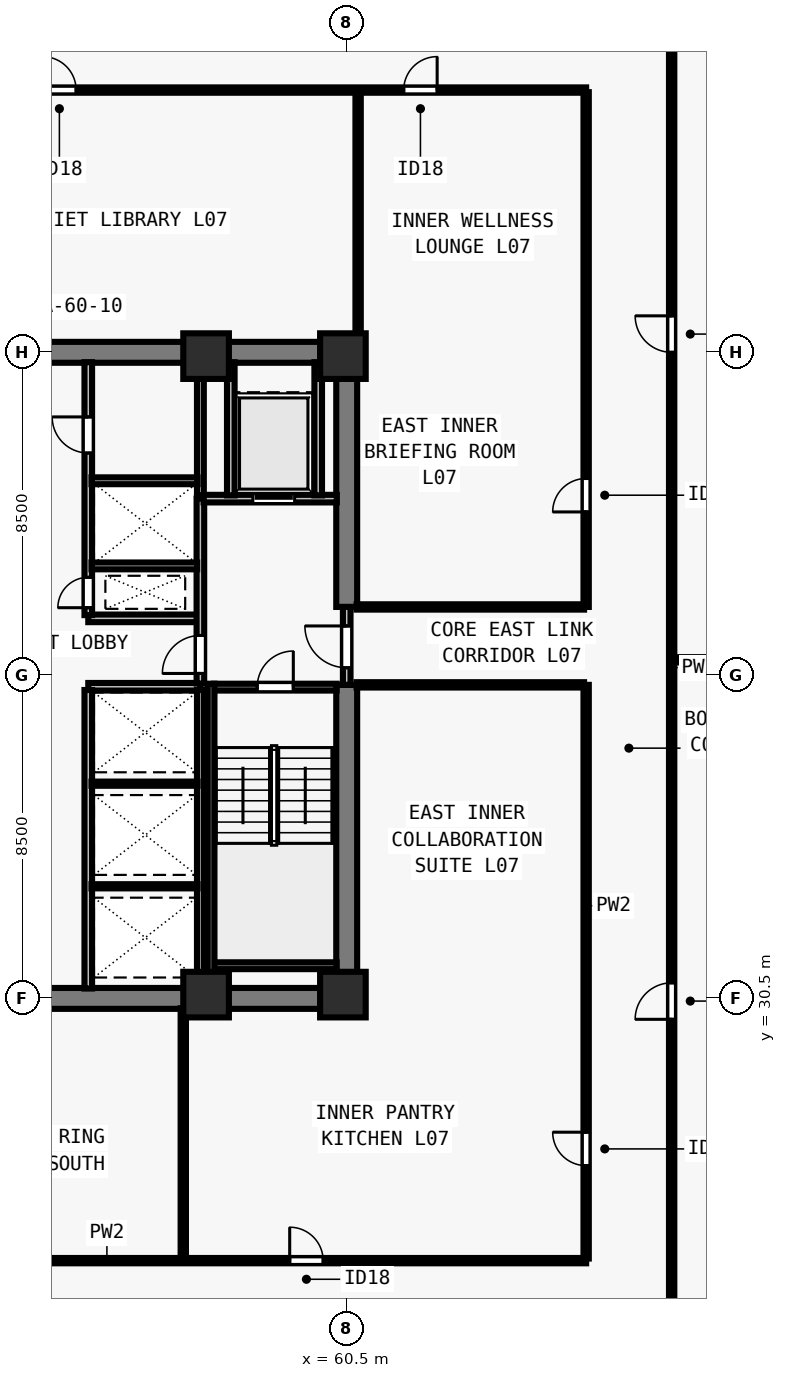
"""IFC4 building model, lengths in metres.
Left out: names, types, materials, properties, quantities, classifications, styles, units other than length and angle.
Written with IfcOpenShell. Run it as: python <this file> out.ifc"""

import sys

from ifc_helpers import new_model, si_unit, direction, frame, frame_2d, origin, origin_2d, place, context, subcontext, project, spatial, rectangle, extrude, element, fill, save


model = new_model("IFC4")
c1 = context("Model", 3, precision=1e-05, world=origin(), true_north=direction((0.0, 1.0)))
c2 = subcontext(c1, "Body", "Model", "MODEL_VIEW")
j1 = project(units=[si_unit("LENGTHUNIT", "METRE"), si_unit("PLANEANGLEUNIT", "RADIAN")], contexts=[c1])
p1 = place(None, origin())
s1 = spatial("IfcSite", under=j1, at=p1, CompositionType="ELEMENT")
p2 = place(p1, origin())
s2 = spatial("IfcBuilding", under=s1, at=p2, CompositionType="ELEMENT")
p3 = place(p2, frame((0.0, 0.0, 30.5)))
s3 = spatial("IfcBuildingStorey", under=s2, at=p3, CompositionType="ELEMENT", Elevation=30.5)
for number, where, z_axis, x_axis in (
    (1, (56.8, 30.6, 0.0), (0.0, 0.0, 1.0), (1.0, 0.0, 0.0)),
    (2, (60.4, 30.6, 0.0), (0.0, 0.0, 1.0), (1.0, 0.0, 0.0)),
    (3, (56.8, 47.4, 0.0), (0.0, 0.0, 1.0), (1.0, 0.0, 0.0)),
    (4, (60.4, 47.4, 0.0), (0.0, 0.0, 1.0), (1.0, 0.0, 0.0)),
):
    element("IfcColumn", number, at=place(p3, frame(where, z_axis=z_axis, x_axis=x_axis)), inside=s3, PredefinedType="COLUMN", context=c2, shape_type="SweptSolid", body=[
        extrude(rectangle(XDim=1.2, YDim=1.2, at=origin_2d()), origin(), (0.0, 0.0, 1.0), 3.5),
    ])
for number, where, z_axis, x_axis in (
    (5, (43.225, 30.5, 0.0), (0.0, 0.0, 1.0), (1.0, 0.0, 0.0)),
    (6, (43.225, 47.5, 0.0), (0.0, 0.0, 1.0), (1.0, 0.0, 0.0)),
):
    element("IfcWall", number, at=place(p3, frame(where, z_axis=z_axis, x_axis=x_axis)), inside=s3, PredefinedType="SHEAR", context=c2, shape_type="SweptSolid", body=[
        extrude(rectangle(XDim=17.55, YDim=0.55, at=frame_2d((8.775, 0.0))), origin(), (0.0, 0.0, 1.0), 3.28),
    ])
p4 = place(p3, frame((60.5, 30.765, 0.0), z_axis=(0.0, 0.0, 1.0), x_axis=(0.0, 1.0, 0.0)))
e7 = element("IfcWall", 7, at=p4, inside=s3, PredefinedType="SHEAR", context=c2, shape_type="SweptSolid", body=[
    extrude(rectangle(XDim=7.985, YDim=0.55, at=frame_2d((3.993, 0.0))), origin(), (0.0, 0.0, 1.0), 3.28),
])
p5 = place(p3, frame((60.5, 40.8, 0.0), z_axis=(0.0, 0.0, 1.0), x_axis=(0.0, 1.0, 0.0)))
e8 = element("IfcWall", 8, at=p5, inside=s3, PredefinedType="SHEAR", context=c2, shape_type="SweptSolid", body=[
    extrude(rectangle(XDim=6.435, YDim=0.55, at=frame_2d((3.218, 0.0))), origin(), (0.0, 0.0, 1.0), 3.28),
])
for number, where, z_axis, x_axis in (
    (9, (53.7, 38.7, 0.0), (0.0, 0.0, 1.0), (1.0, 0.0, 0.0)),
    (10, (53.7, 40.5, 0.0), (0.0, 0.0, 1.0), (1.0, 0.0, 0.0)),
):
    element("IfcWall", number, at=place(p3, frame(where, z_axis=z_axis, x_axis=x_axis)), inside=s3, PredefinedType="SOLIDWALL", context=c2, shape_type="SweptSolid", body=[
        extrude(rectangle(XDim=2.95, YDim=0.2, at=frame_2d((1.475, 0.0))), origin(), (0.0, 0.0, 1.0), 3.28),
    ])
p6 = place(p3, frame((53.7, 30.76, 0.0), z_axis=(0.0, 0.0, 1.0), x_axis=(0.0, 1.0, 0.0)))
e11 = element("IfcWall", 11, at=p6, inside=s3, PredefinedType="SOLIDWALL", context=c2, shape_type="SweptSolid", body=[
    extrude(rectangle(XDim=7.855, YDim=0.2, at=frame_2d((3.927, 0.0))), origin(), (0.0, 0.0, 1.0), 3.28),
])
p7 = place(p3, frame((53.7, 40.585, 0.0), z_axis=(0.0, 0.0, 1.0), x_axis=(0.0, 1.0, 0.0)))
e12 = element("IfcWall", 12, at=p7, inside=s3, PredefinedType="SOLIDWALL", context=c2, shape_type="SweptSolid", body=[
    extrude(rectangle(XDim=6.655, YDim=0.2, at=frame_2d((3.328, 0.0))), origin(), (0.0, 0.0, 1.0), 3.28),
])
p8 = place(p7, frame((0.195, 0.0, 0.0)))
e13 = element("IfcOpeningElement", 13, at=p8, cuts=e12, PredefinedType="OPENING", context=c2, shape_type="SweptSolid", body=[
    extrude(rectangle(XDim=0.8, YDim=2.08, at=frame_2d((0.4, 1.04))), frame((0.0, 0.11, 0.0), z_axis=(0.0, -1.0, 0.0), x_axis=(1.0, 0.0, 0.0)), (0.0, 0.0, 1.0), 0.22),
])
p9 = place(p7, frame((4.265, 0.0, 0.0)))
e14 = element("IfcOpeningElement", 14, at=p9, cuts=e12, PredefinedType="OPENING", context=c2, shape_type="SweptSolid", body=[
    extrude(rectangle(XDim=0.95, YDim=2.12, at=frame_2d((0.475, 1.06))), frame((0.0, 0.11, 0.0), z_axis=(0.0, -1.0, 0.0), x_axis=(1.0, 0.0, 0.0)), (0.0, 0.0, 1.0), 0.22),
])
p10 = place(p3, frame((60.5, 38.75, 0.0), z_axis=(0.0, 0.0, 1.0), x_axis=(0.0, 1.0, 0.0)))
e15 = element("IfcWall", 15, at=p10, inside=s3, PredefinedType="SOLIDWALL", context=c2, shape_type="SweptSolid", body=[
    extrude(rectangle(XDim=2.05, YDim=0.2, at=frame_2d((1.025, 0.0))), origin(), (0.0, 0.0, 1.0), 3.28),
])
p11 = place(p10, frame((0.45, 0.0, 0.0)))
e16 = element("IfcOpeningElement", 16, at=p11, cuts=e15, PredefinedType="OPENING", context=c2, shape_type="SweptSolid", body=[
    extrude(rectangle(XDim=1.1, YDim=2.15, at=frame_2d((0.55, 1.075))), frame((0.0, 0.11, 0.0), z_axis=(0.0, -1.0, 0.0), x_axis=(1.0, 0.0, 0.0)), (0.0, 0.0, 1.0), 0.22),
])
p12 = place(p3, frame((56.65, 38.785, 0.0), z_axis=(0.0, 0.0, 1.0), x_axis=(0.0, 1.0, 0.0)))
e17 = element("IfcWall", 17, at=p12, inside=s3, PredefinedType="SOLIDWALL", context=c2, shape_type="SweptSolid", body=[
    extrude(rectangle(XDim=4.865, YDim=0.2, at=frame_2d((2.433, 0.0))), origin(), (0.0, 0.0, 1.0), 3.28),
])
p13 = place(p12, frame((0.265, 0.0, 0.0)))
e18 = element("IfcOpeningElement", 18, at=p13, cuts=e17, PredefinedType="OPENING", context=c2, shape_type="SweptSolid", body=[
    extrude(rectangle(XDim=1.0, YDim=2.15, at=frame_2d((0.5, 1.075))), frame((0.0, 0.11, 0.0), z_axis=(0.0, -1.0, 0.0), x_axis=(1.0, 0.0, 0.0)), (0.0, 0.0, 1.0), 0.22),
])
p14 = place(p3, frame((56.735, 43.65, 0.0), z_axis=(0.0, 0.0, 1.0), x_axis=(1.0, 0.0, 0.0)))
e19 = element("IfcWall", 19, at=p14, inside=s3, PredefinedType="SOLIDWALL", context=c2, shape_type="SweptSolid", body=[
    extrude(rectangle(XDim=3.505, YDim=0.2, at=frame_2d((1.752, 0.0))), origin(), (0.0, 0.0, 1.0), 3.28),
])
p15 = place(p14, frame((1.295, 0.0, 0.0)))
e20 = element("IfcOpeningElement", 20, at=p15, cuts=e19, PredefinedType="OPENING", context=c2, shape_type="SweptSolid", body=[
    extrude(rectangle(XDim=1.1, YDim=2.2, at=frame_2d((0.55, 1.1))), frame((0.0, 0.11, 0.0), z_axis=(0.0, -1.0, 0.0), x_axis=(1.0, 0.0, 0.0)), (0.0, 0.0, 1.0), 0.22),
])
for number, where, z_axis, x_axis in (
    (21, (57.45, 43.735, 0.0), (0.0, 0.0, 1.0), (0.0, 1.0, 0.0)),
    (22, (59.75, 43.735, 0.0), (0.0, 0.0, 1.0), (0.0, 1.0, 0.0)),
):
    element("IfcWall", number, at=place(p3, frame(where, z_axis=z_axis, x_axis=x_axis)), inside=s3, PredefinedType="SOLIDWALL", context=c2, shape_type="SweptSolid", body=[
        extrude(rectangle(XDim=3.505, YDim=0.2, at=frame_2d((1.752, 0.0))), origin(), (0.0, 0.0, 1.0), 3.28),
    ])
p16 = place(p3, frame((56.65, 30.76, 0.0), z_axis=(0.0, 0.0, 1.0), x_axis=(0.0, 1.0, 0.0)))
e23 = element("IfcWall", 23, at=p16, inside=s3, PredefinedType="SOLIDWALL", context=c2, shape_type="SweptSolid", body=[
    extrude(rectangle(XDim=7.855, YDim=0.18, at=frame_2d((3.927, 0.0))), origin(), (0.0, 0.0, 1.0), 3.28),
])
for number, where, z_axis, x_axis in (
    (24, (53.785, 33.45, 0.0), (0.0, 0.0, 1.0), (1.0, 0.0, 0.0)),
    (25, (53.785, 36.15, 0.0), (0.0, 0.0, 1.0), (1.0, 0.0, 0.0)),
):
    element("IfcWall", number, at=place(p3, frame(where, z_axis=z_axis, x_axis=x_axis)), inside=s3, PredefinedType="PARTITIONING", context=c2, shape_type="SweptSolid", body=[
        extrude(rectangle(XDim=2.79, YDim=0.11, at=frame_2d((1.395, 0.0))), origin(), (0.0, 0.0, 1.0), 3.28),
    ])
p17 = place(p3, frame((56.65, 43.735, 0.0), z_axis=(0.0, 0.0, 1.0), x_axis=(0.0, 1.0, 0.0)))
e26 = element("IfcWall", 26, at=p17, inside=s3, PredefinedType="SOLIDWALL", context=c2, shape_type="SweptSolid", body=[
    extrude(rectangle(XDim=3.505, YDim=0.18, at=frame_2d((1.752, 0.0))), origin(), (0.0, 0.0, 1.0), 3.28),
])
p18 = place(p3, frame((53.785, 41.88, 0.0), z_axis=(0.0, 0.0, 1.0), x_axis=(1.0, 0.0, 0.0)))
e27 = element("IfcWall", 27, at=p18, inside=s3, PredefinedType="SOLIDWALL", context=c2, shape_type="SweptSolid", body=[
    extrude(rectangle(XDim=2.78, YDim=0.18, at=frame_2d((1.39, 0.0))), origin(), (0.0, 0.0, 1.0), 3.28),
])
p19 = place(p3, frame((53.785, 44.12, 0.0), z_axis=(0.0, 0.0, 1.0), x_axis=(1.0, 0.0, 0.0)))
e28 = element("IfcWall", 28, at=p19, inside=s3, PredefinedType="SOLIDWALL", context=c2, shape_type="SweptSolid", body=[
    extrude(rectangle(XDim=2.79, YDim=0.18, at=frame_2d((1.395, 0.0))), origin(), (0.0, 0.0, 1.0), 3.28),
])
p20 = place(p3, frame((69.05, 21.405, 0.0), z_axis=(0.0, 0.0, 1.0), x_axis=(0.0, 1.0, 0.0)))
e29 = element("IfcWall", 29, at=p20, inside=s3, PredefinedType="PARTITIONING", context=c2, shape_type="SweptSolid", body=[
    extrude(rectangle(XDim=35.19, YDim=0.14, at=frame_2d((17.595, 0.0))), origin(), (0.0, 0.0, 1.0), 3.28),
])
p21 = place(p20, frame((8.545, 0.0, 0.0)))
e30 = element("IfcOpeningElement", 30, at=p21, cuts=e29, PredefinedType="OPENING", context=c2, shape_type="SweptSolid", body=[
    extrude(rectangle(XDim=0.96, YDim=2.12, at=frame_2d((0.48, 1.06))), frame((0.0, 0.08, 0.0), z_axis=(0.0, -1.0, 0.0), x_axis=(1.0, 0.0, 0.0)), (0.0, 0.0, 1.0), 0.16),
])
p22 = place(p20, frame((26.095, 0.0, 0.0)))
e31 = element("IfcOpeningElement", 31, at=p22, cuts=e29, PredefinedType="OPENING", context=c2, shape_type="SweptSolid", body=[
    extrude(rectangle(XDim=0.96, YDim=2.12, at=frame_2d((0.48, 1.06))), frame((0.0, 0.08, 0.0), z_axis=(0.0, -1.0, 0.0), x_axis=(1.0, 0.0, 0.0)), (0.0, 0.0, 1.0), 0.16),
])
p23 = place(p3, frame((37.2, 23.6, 0.0), z_axis=(0.0, 0.0, 1.0), x_axis=(1.0, 0.0, 0.0)))
e32 = element("IfcWall", 32, at=p23, inside=s3, PredefinedType="PARTITIONING", context=c2, shape_type="SweptSolid", body=[
    extrude(rectangle(XDim=29.6, YDim=0.14, at=frame_2d((14.8, 0.0))), origin(), (0.0, 0.0, 1.0), 3.28),
])
p24 = place(p23, frame((1.2, 0.0, 0.0)))
e33 = element("IfcOpeningElement", 33, at=p24, cuts=e32, PredefinedType="OPENING", context=c2, shape_type="SweptSolid", body=[
    extrude(rectangle(XDim=0.88, YDim=2.1, at=frame_2d((0.44, 1.05))), frame((0.0, 0.08, 0.0), z_axis=(0.0, -1.0, 0.0), x_axis=(1.0, 0.0, 0.0)), (0.0, 0.0, 1.0), 0.16),
])
p25 = place(p23, frame((11.3, 0.0, 0.0)))
e34 = element("IfcOpeningElement", 34, at=p25, cuts=e32, PredefinedType="OPENING", context=c2, shape_type="SweptSolid", body=[
    extrude(rectangle(XDim=0.88, YDim=2.1, at=frame_2d((0.44, 1.05))), frame((0.0, 0.08, 0.0), z_axis=(0.0, -1.0, 0.0), x_axis=(1.0, 0.0, 0.0)), (0.0, 0.0, 1.0), 0.16),
])
p26 = place(p23, frame((21.8, 0.0, 0.0)))
e35 = element("IfcOpeningElement", 35, at=p26, cuts=e32, PredefinedType="OPENING", context=c2, shape_type="SweptSolid", body=[
    extrude(rectangle(XDim=0.88, YDim=2.1, at=frame_2d((0.44, 1.05))), frame((0.0, 0.08, 0.0), z_axis=(0.0, -1.0, 0.0), x_axis=(1.0, 0.0, 0.0)), (0.0, 0.0, 1.0), 0.16),
])
p27 = place(p3, frame((37.2, 54.4, 0.0), z_axis=(0.0, 0.0, 1.0), x_axis=(1.0, 0.0, 0.0)))
e36 = element("IfcWall", 36, at=p27, inside=s3, PredefinedType="PARTITIONING", context=c2, shape_type="SweptSolid", body=[
    extrude(rectangle(XDim=29.6, YDim=0.14, at=frame_2d((14.8, 0.0))), origin(), (0.0, 0.0, 1.0), 3.28),
])
p28 = place(p27, frame((2.2, 0.0, 0.0)))
e37 = element("IfcOpeningElement", 37, at=p28, cuts=e36, PredefinedType="OPENING", context=c2, shape_type="SweptSolid", body=[
    extrude(rectangle(XDim=0.88, YDim=2.1, at=frame_2d((0.44, 1.05))), frame((0.0, 0.08, 0.0), z_axis=(0.0, -1.0, 0.0), x_axis=(1.0, 0.0, 0.0)), (0.0, 0.0, 1.0), 0.16),
])
p29 = place(p27, frame((15.3, 0.0, 0.0)))
e38 = element("IfcOpeningElement", 38, at=p29, cuts=e36, PredefinedType="OPENING", context=c2, shape_type="SweptSolid", body=[
    extrude(rectangle(XDim=0.88, YDim=2.1, at=frame_2d((0.44, 1.05))), frame((0.0, 0.08, 0.0), z_axis=(0.0, -1.0, 0.0), x_axis=(1.0, 0.0, 0.0)), (0.0, 0.0, 1.0), 0.16),
])
p30 = place(p27, frame((24.8, 0.0, 0.0)))
e39 = element("IfcOpeningElement", 39, at=p30, cuts=e36, PredefinedType="OPENING", context=c2, shape_type="SweptSolid", body=[
    extrude(rectangle(XDim=0.88, YDim=2.1, at=frame_2d((0.44, 1.05))), frame((0.0, 0.08, 0.0), z_axis=(0.0, -1.0, 0.0), x_axis=(1.0, 0.0, 0.0)), (0.0, 0.0, 1.0), 0.16),
])
p31 = place(p3, frame((66.8, 23.655, 0.0), z_axis=(0.0, 0.0, 1.0), x_axis=(0.0, 1.0, 0.0)))
e40 = element("IfcWall", 40, at=p31, inside=s3, PredefinedType="PARTITIONING", context=c2, shape_type="SweptSolid", body=[
    extrude(rectangle(XDim=15.095, YDim=0.14, at=frame_2d((7.547, 0.0))), origin(), (0.0, 0.0, 1.0), 3.28),
])
p32 = place(p31, frame((2.445, 0.0, 0.0)))
e41 = element("IfcOpeningElement", 41, at=p32, cuts=e40, PredefinedType="OPENING", context=c2, shape_type="SweptSolid", body=[
    extrude(rectangle(XDim=0.88, YDim=2.1, at=frame_2d((0.44, 1.05))), frame((0.0, 0.08, 0.0), z_axis=(0.0, -1.0, 0.0), x_axis=(1.0, 0.0, 0.0)), (0.0, 0.0, 1.0), 0.16),
])
p33 = place(p3, frame((66.8, 40.8, 0.0), z_axis=(0.0, 0.0, 1.0), x_axis=(0.0, 1.0, 0.0)))
e42 = element("IfcWall", 42, at=p33, inside=s3, PredefinedType="PARTITIONING", context=c2, shape_type="SweptSolid", body=[
    extrude(rectangle(XDim=13.545, YDim=0.14, at=frame_2d((6.772, 0.0))), origin(), (0.0, 0.0, 1.0), 3.28),
])
p34 = place(p33, frame((2.5, 0.0, 0.0)))
e43 = element("IfcOpeningElement", 43, at=p34, cuts=e42, PredefinedType="OPENING", context=c2, shape_type="SweptSolid", body=[
    extrude(rectangle(XDim=0.88, YDim=2.1, at=frame_2d((0.44, 1.05))), frame((0.0, 0.08, 0.0), z_axis=(0.0, -1.0, 0.0), x_axis=(1.0, 0.0, 0.0)), (0.0, 0.0, 1.0), 0.16),
])
for number, where, z_axis, x_axis in (
    (44, (60.76, 38.75, 0.0), (0.0, 0.0, 1.0), (1.0, 0.0, 0.0)),
    (45, (60.76, 40.8, 0.0), (0.0, 0.0, 1.0), (1.0, 0.0, 0.0)),
):
    element("IfcWall", number, at=place(p3, frame(where, z_axis=z_axis, x_axis=x_axis)), inside=s3, PredefinedType="PARTITIONING", context=c2, shape_type="SweptSolid", body=[
        extrude(rectangle(XDim=5.985, YDim=0.14, at=frame_2d((2.993, 0.0))), origin(), (0.0, 0.0, 1.0), 3.28),
    ])
p35 = place(p3, frame((56.2, 23.655, 0.0), z_axis=(0.0, 0.0, 1.0), x_axis=(0.0, 1.0, 0.0)))
e46 = element("IfcWall", 46, at=p35, inside=s3, PredefinedType="PARTITIONING", context=c2, shape_type="SweptSolid", body=[
    extrude(rectangle(XDim=6.585, YDim=0.14, at=frame_2d((3.292, 0.0))), origin(), (0.0, 0.0, 1.0), 2.849),
])
p36 = place(p3, frame((60.8, 47.76, 0.0), z_axis=(0.0, 0.0, 1.0), x_axis=(0.0, 1.0, 0.0)))
e47 = element("IfcWall", 47, at=p36, inside=s3, PredefinedType="PARTITIONING", context=c2, shape_type="SweptSolid", body=[
    extrude(rectangle(XDim=6.585, YDim=0.14, at=frame_2d((3.292, 0.0))), origin(), (0.0, 0.0, 1.0), 2.439),
])
p37 = place(p3, frame((69.15, 39.409, 0.0), z_axis=(0.0, 0.0, 1.0), x_axis=(1.0, 0.0, 0.0)))
e48 = element("IfcWall", 48, at=p37, inside=s3, PredefinedType="PARTITIONING", context=c2, shape_type="SweptSolid", body=[
    extrude(rectangle(XDim=7.93, YDim=0.14, at=frame_2d((3.965, 0.0))), origin(), (0.0, 0.0, 1.0), 3.28),
])
p38 = place(p3, frame((57.005, 38.69, 0.0), z_axis=(0.0, 0.0, 1.0), x_axis=(1.0, 0.0, 0.0)))
e49 = element("IfcWall", 49, at=p38, inside=s3, PredefinedType="SOLIDWALL", context=c2, shape_type="SweptSolid", body=[
    extrude(rectangle(XDim=3.23, YDim=0.18, at=frame_2d((1.615, 0.0))), origin(), (0.0, 0.0, 1.0), 3.28),
])
p39 = place(p38, frame((1.14, 0.0, 0.0)))
e50 = element("IfcOpeningElement", 50, at=p39, cuts=e49, PredefinedType="OPENING", context=c2, shape_type="SweptSolid", body=[
    extrude(rectangle(XDim=0.95, YDim=2.15, at=frame_2d((0.475, 1.075))), frame((0.0, 0.1, 0.0), z_axis=(0.0, -1.0, 0.0), x_axis=(1.0, 0.0, 0.0)), (0.0, 0.0, 1.0), 0.2),
])
p40 = place(p3, frame((57.005, 31.36, 0.0), z_axis=(0.0, 0.0, 1.0), x_axis=(1.0, 0.0, 0.0)))
e51 = element("IfcWall", 51, at=p40, inside=s3, PredefinedType="SOLIDWALL", context=c2, shape_type="SweptSolid", body=[
    extrude(rectangle(XDim=3.23, YDim=0.18, at=frame_2d((1.615, 0.0))), origin(), (0.0, 0.0, 1.0), 3.28),
])
p41 = place(p3, frame((56.93, 38.78, 0.0), z_axis=(0.0, 0.0, 1.0), x_axis=(0.0, -1.0, 0.0)))
e52 = element("IfcWall", 52, at=p41, inside=s3, PredefinedType="SOLIDWALL", context=c2, shape_type="SweptSolid", body=[
    extrude(rectangle(XDim=8.017, YDim=0.18, at=frame_2d((4.009, 0.0))), origin(), (0.0, 0.0, 1.0), 3.28),
])
p42 = place(p11, origin())
e53 = element("IfcDoor", 53, at=p42, inside=s3, OperationType="SINGLE_SWING_RIGHT", PredefinedType="DOOR", context=c2, shape_type="SweptSolid", body=[
    extrude(rectangle(XDim=1.1, YDim=2.15, at=frame_2d((0.55, 1.075))), frame((0.0, 0.025, 0.0), z_axis=(0.0, -1.0, 0.0), x_axis=(1.0, 0.0, 0.0)), (0.0, 0.0, 1.0), 0.05),
])
fill(e16, e53)
p43 = place(p13, origin())
e54 = element("IfcDoor", 54, at=p43, inside=s3, OperationType="SINGLE_SWING_LEFT", PredefinedType="DOOR", context=c2, shape_type="SweptSolid", body=[
    extrude(rectangle(XDim=1.0, YDim=2.15, at=frame_2d((0.5, 1.075))), frame((0.0, 0.025, 0.0), z_axis=(0.0, -1.0, 0.0), x_axis=(1.0, 0.0, 0.0)), (0.0, 0.0, 1.0), 0.05),
])
fill(e18, e54)
p44 = place(p15, origin())
e55 = element("IfcDoor", 55, at=p44, inside=s3, OperationType="SLIDING_TO_LEFT", PredefinedType="DOOR", context=c2, shape_type="SweptSolid", body=[
    extrude(rectangle(XDim=1.1, YDim=2.2, at=frame_2d((0.55, 1.1))), frame((0.0, 0.025, 0.0), z_axis=(0.0, -1.0, 0.0), x_axis=(1.0, 0.0, 0.0)), (0.0, 0.0, 1.0), 0.05),
])
fill(e20, e55)
p45 = place(p8, origin())
e56 = element("IfcDoor", 56, at=p45, inside=s3, OperationType="SINGLE_SWING_LEFT", PredefinedType="DOOR", context=c2, shape_type="SweptSolid", body=[
    extrude(rectangle(XDim=0.8, YDim=2.08, at=frame_2d((0.4, 1.04))), frame((0.0, 0.025, 0.0), z_axis=(0.0, -1.0, 0.0), x_axis=(1.0, 0.0, 0.0)), (0.0, 0.0, 1.0), 0.05),
])
fill(e13, e56)
p46 = place(p9, origin())
e57 = element("IfcDoor", 57, at=p46, inside=s3, OperationType="SINGLE_SWING_RIGHT", PredefinedType="DOOR", context=c2, shape_type="SweptSolid", body=[
    extrude(rectangle(XDim=0.95, YDim=2.12, at=frame_2d((0.475, 1.06))), frame((0.0, 0.025, 0.0), z_axis=(0.0, -1.0, 0.0), x_axis=(1.0, 0.0, 0.0)), (0.0, 0.0, 1.0), 0.05),
])
fill(e14, e57)
p47 = place(p26, origin())
e58 = element("IfcDoor", 58, at=p47, inside=s3, OperationType="SINGLE_SWING_LEFT", PredefinedType="DOOR", context=c2, shape_type="SweptSolid", body=[
    extrude(rectangle(XDim=0.88, YDim=2.1, at=frame_2d((0.44, 1.05))), frame((0.0, 0.025, 0.0), z_axis=(0.0, -1.0, 0.0), x_axis=(1.0, 0.0, 0.0)), (0.0, 0.0, 1.0), 0.05),
])
fill(e35, e58)
p48 = place(p29, origin())
e59 = element("IfcDoor", 59, at=p48, inside=s3, OperationType="SINGLE_SWING_LEFT", PredefinedType="DOOR", context=c2, shape_type="SweptSolid", body=[
    extrude(rectangle(XDim=0.88, YDim=2.1, at=frame_2d((0.44, 1.05))), frame((0.0, 0.025, 0.0), z_axis=(0.0, -1.0, 0.0), x_axis=(1.0, 0.0, 0.0)), (0.0, 0.0, 1.0), 0.05),
])
fill(e38, e59)
p49 = place(p30, origin())
e60 = element("IfcDoor", 60, at=p49, inside=s3, OperationType="SINGLE_SWING_RIGHT", PredefinedType="DOOR", context=c2, shape_type="SweptSolid", body=[
    extrude(rectangle(XDim=0.88, YDim=2.1, at=frame_2d((0.44, 1.05))), frame((0.0, 0.025, 0.0), z_axis=(0.0, -1.0, 0.0), x_axis=(1.0, 0.0, 0.0)), (0.0, 0.0, 1.0), 0.05),
])
fill(e39, e60)
p50 = place(p32, origin())
e61 = element("IfcDoor", 61, at=p50, inside=s3, OperationType="SINGLE_SWING_RIGHT", PredefinedType="DOOR", context=c2, shape_type="SweptSolid", body=[
    extrude(rectangle(XDim=0.88, YDim=2.1, at=frame_2d((0.44, 1.05))), frame((0.0, 0.025, 0.0), z_axis=(0.0, -1.0, 0.0), x_axis=(1.0, 0.0, 0.0)), (0.0, 0.0, 1.0), 0.05),
])
fill(e41, e61)
p51 = place(p34, origin())
e62 = element("IfcDoor", 62, at=p51, inside=s3, OperationType="SINGLE_SWING_LEFT", PredefinedType="DOOR", context=c2, shape_type="SweptSolid", body=[
    extrude(rectangle(XDim=0.88, YDim=2.1, at=frame_2d((0.44, 1.05))), frame((0.0, 0.025, 0.0), z_axis=(0.0, -1.0, 0.0), x_axis=(1.0, 0.0, 0.0)), (0.0, 0.0, 1.0), 0.05),
])
fill(e43, e62)
p52 = place(p21, origin())
e63 = element("IfcDoor", 63, at=p52, inside=s3, OperationType="SINGLE_SWING_LEFT", PredefinedType="DOOR", context=c2, shape_type="SweptSolid", body=[
    extrude(rectangle(XDim=0.96, YDim=2.12, at=frame_2d((0.48, 1.06))), frame((0.0, 0.025, 0.0), z_axis=(0.0, -1.0, 0.0), x_axis=(1.0, 0.0, 0.0)), (0.0, 0.0, 1.0), 0.05),
])
fill(e30, e63)
p53 = place(p22, origin())
e64 = element("IfcDoor", 64, at=p53, inside=s3, OperationType="SINGLE_SWING_RIGHT", PredefinedType="DOOR", context=c2, shape_type="SweptSolid", body=[
    extrude(rectangle(XDim=0.96, YDim=2.12, at=frame_2d((0.48, 1.06))), frame((0.0, 0.025, 0.0), z_axis=(0.0, -1.0, 0.0), x_axis=(1.0, 0.0, 0.0)), (0.0, 0.0, 1.0), 0.05),
])
fill(e31, e64)
p54 = place(p39, origin())
e65 = element("IfcDoor", 65, at=p54, inside=s3, OperationType="SINGLE_SWING_RIGHT", PredefinedType="DOOR", context=c2, shape_type="SweptSolid", body=[
    extrude(rectangle(XDim=0.95, YDim=2.15, at=frame_2d((0.475, 1.075))), frame((0.0, 0.025, 0.0), z_axis=(0.0, -1.0, 0.0), x_axis=(1.0, 0.0, 0.0)), (0.0, 0.0, 1.0), 0.05),
])
fill(e50, e65)
save(model, sys.argv[1])
